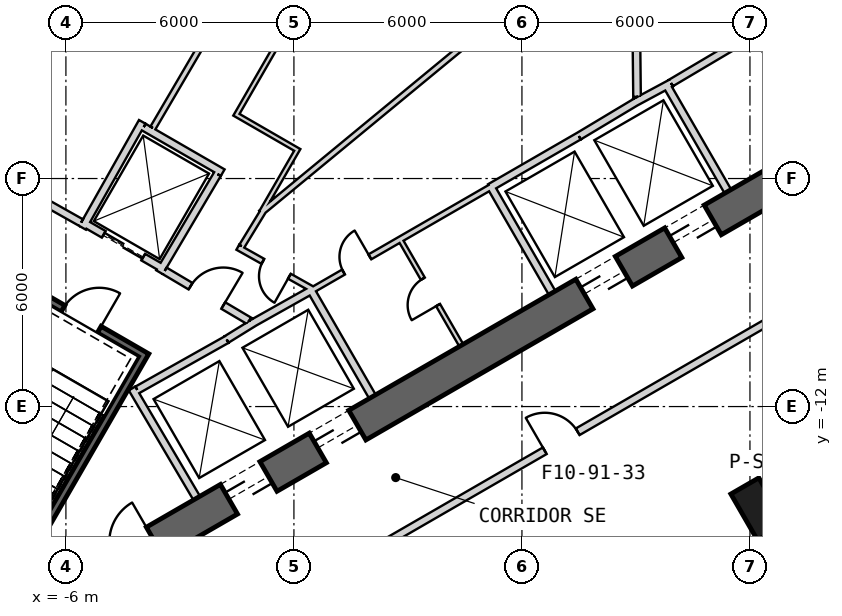
"""IFC4 building model, lengths in metres.
Left out: names, types, materials, properties, quantities, classifications, styles, units other than length and angle.
Written with IfcOpenShell. Run it as: python <this file> out.ifc"""

import sys

from ifc_helpers import new_model, si_unit, direction, frame, frame_2d, origin, origin_2d, place, context, subcontext, project, spatial, rectangle, extrude, element, fill, save


model = new_model("IFC4")
c1 = context("Model", 3, precision=1e-05, world=origin(), true_north=direction((0.0, 1.0)))
c2 = subcontext(c1, "Body", "Model", "MODEL_VIEW")
j1 = project(units=[si_unit("LENGTHUNIT", "METRE"), si_unit("PLANEANGLEUNIT", "RADIAN")], contexts=[c1])
p1 = place(None, origin())
s1 = spatial("IfcSite", under=j1, at=p1, CompositionType="ELEMENT")
p2 = place(p1, origin())
s2 = spatial("IfcBuilding", under=s1, at=p2, CompositionType="ELEMENT")
p3 = place(p2, frame((0.0, 0.0, 398.3)))
s3 = spatial("IfcBuildingStorey", under=s2, at=p3, CompositionType="ELEMENT", Elevation=398.3)
p4 = place(p3, frame((12.216, -14.695, -0.3), z_axis=(0.0, 0.0, 1.0), x_axis=(0.5, -0.866025403784, 0.0)))
e1 = element("IfcColumn", 1, at=p4, inside=s3, PredefinedType="COLUMN", context=c2, shape_type="SweptSolid", body=[
    extrude(rectangle(XDim=1.4, YDim=0.85, at=origin_2d()), origin(), (0.0, 0.0, 1.0), 6.8),
])
p5 = place(p3, frame((-7.825, -17.97, 0.0), z_axis=(0.0, 0.0, 1.0), x_axis=(0.866028369851, 0.499994862586, 0.0)))
e2 = element("IfcWall", 2, at=p5, inside=s3, PredefinedType="SHEAR", context=c2, shape_type="SweptSolid", body=[
    extrude(rectangle(XDim=31.523, YDim=0.9, at=frame_2d((15.762, 0.0))), origin(), (0.0, 0.0, 1.0), 6.5),
])
p6 = place(p5, frame((7.062, 0.0, 0.0)))
e3 = element("IfcOpeningElement", 3, at=p6, cuts=e2, PredefinedType="OPENING", context=c2, shape_type="SweptSolid", body=[
    extrude(rectangle(XDim=1.2, YDim=2.4, at=frame_2d((0.6, 1.2))), frame((0.0, 0.46, 0.0), z_axis=(0.0, -1.0, 0.0), x_axis=(1.0, 0.0, 0.0)), (0.0, 0.0, 1.0), 0.92),
])
p7 = place(p5, frame((9.762, 0.0, 0.0)))
e4 = element("IfcOpeningElement", 4, at=p7, cuts=e2, PredefinedType="OPENING", context=c2, shape_type="SweptSolid", body=[
    extrude(rectangle(XDim=1.2, YDim=2.4, at=frame_2d((0.6, 1.2))), frame((0.0, 0.46, 0.0), z_axis=(0.0, -1.0, 0.0), x_axis=(1.0, 0.0, 0.0)), (0.0, 0.0, 1.0), 0.92),
])
p8 = place(p5, frame((17.862, 0.0, 0.0)))
e5 = element("IfcOpeningElement", 5, at=p8, cuts=e2, PredefinedType="OPENING", context=c2, shape_type="SweptSolid", body=[
    extrude(rectangle(XDim=1.2, YDim=2.4, at=frame_2d((0.6, 1.2))), frame((0.0, 0.46, 0.0), z_axis=(0.0, -1.0, 0.0), x_axis=(1.0, 0.0, 0.0)), (0.0, 0.0, 1.0), 0.92),
])
p9 = place(p5, frame((20.562, 0.0, 0.0)))
e6 = element("IfcOpeningElement", 6, at=p9, cuts=e2, PredefinedType="OPENING", context=c2, shape_type="SweptSolid", body=[
    extrude(rectangle(XDim=1.2, YDim=2.4, at=frame_2d((0.6, 1.2))), frame((0.0, 0.46, 0.0), z_axis=(0.0, -1.0, 0.0), x_axis=(1.0, 0.0, 0.0)), (0.0, 0.0, 1.0), 0.92),
])
p10 = place(p5, frame((26.712, 0.0, 0.0)))
e7 = element("IfcOpeningElement", 7, at=p10, cuts=e2, PredefinedType="OPENING", context=c2, shape_type="SweptSolid", body=[
    extrude(rectangle(XDim=1.2, YDim=2.4, at=frame_2d((0.6, 1.2))), frame((0.0, 0.46, 0.0), z_axis=(0.0, -1.0, 0.0), x_axis=(1.0, 0.0, 0.0)), (0.0, 0.0, 1.0), 0.92),
])
p11 = place(p5, frame((3.612, 0.0, 0.0)))
e8 = element("IfcOpeningElement", 8, at=p11, cuts=e2, PredefinedType="OPENING", context=c2, shape_type="SweptSolid", body=[
    extrude(rectangle(XDim=1.2, YDim=2.4, at=frame_2d((0.6, 1.2))), frame((0.0, 0.46, 0.0), z_axis=(0.0, -1.0, 0.0), x_axis=(1.0, 0.0, 0.0)), (0.0, 0.0, 1.0), 0.92),
])
p12 = place(p3, frame((-2.558, -14.409, 0.0), z_axis=(0.0, 0.0, 1.0), x_axis=(-0.507997497166, 0.861358544901, 0.0)))
e9 = element("IfcWall", 9, at=p12, inside=s3, PredefinedType="PLUMBINGWALL", context=c2, shape_type="SweptSolid", body=[
    extrude(rectangle(XDim=3.35, YDim=0.2, at=frame_2d((1.675, 0.0))), origin(), (0.0, 0.0, 1.0), 6.2),
])
p13 = place(p3, frame((-1.769, -10.237, 0.0), z_axis=(0.0, 0.0, 1.0), x_axis=(-0.871534483978, -0.490334215854, 0.0)))
e10 = element("IfcWall", 10, at=p13, inside=s3, PredefinedType="PLUMBINGWALL", context=c2, shape_type="SweptSolid", body=[
    extrude(rectangle(XDim=2.7, YDim=0.2, at=frame_2d((1.35, 0.0))), origin(), (0.0, 0.0, 1.0), 6.2),
])
p14 = place(p3, frame((0.442, -8.925, 0.0), z_axis=(0.0, 0.0, 1.0), x_axis=(0.499984717929, -0.866034226713, 0.0)))
e11 = element("IfcWall", 11, at=p14, inside=s3, PredefinedType="PLUMBINGWALL", context=c2, shape_type="SweptSolid", body=[
    extrude(rectangle(XDim=3.25, YDim=0.2, at=frame_2d((1.625, 0.0))), origin(), (0.0, 0.0, 1.0), 6.2),
])
p15 = place(p3, frame((-1.024, -9.771, 0.0), z_axis=(0.0, 0.0, 1.0), x_axis=(-0.850348075135, -0.526220629693, 0.0)))
e12 = element("IfcWall", 12, at=p15, inside=s3, PredefinedType="PLUMBINGWALL", context=c2, shape_type="SweptSolid", body=[
    extrude(rectangle(XDim=0.878, YDim=0.2, at=frame_2d((0.439, 0.0))), origin(), (0.0, 0.0, 1.0), 6.2),
])
p16 = place(p3, frame((-1.13, -9.832, 0.0), z_axis=(0.0, 0.0, 1.0), x_axis=(0.871988740738, 0.489525929882, 0.0)))
e13 = element("IfcWall", 13, at=p16, inside=s3, PredefinedType="PLUMBINGWALL", context=c2, shape_type="SweptSolid", body=[
    extrude(rectangle(XDim=1.845, YDim=0.2, at=frame_2d((0.922, 0.0))), origin(), (0.0, 0.0, 1.0), 6.2),
])
p17 = place(p3, frame((6.795, -9.01, 0.0), z_axis=(0.0, 0.0, 1.0), x_axis=(-0.499984717929, 0.866034226713, 0.0)))
e14 = element("IfcWall", 14, at=p17, inside=s3, PredefinedType="PLUMBINGWALL", context=c2, shape_type="SweptSolid", body=[
    extrude(rectangle(XDim=3.25, YDim=0.2, at=frame_2d((1.625, 0.0))), origin(), (0.0, 0.0, 1.0), 6.2),
])
p18 = place(p3, frame((5.159, -6.236, 0.0), z_axis=(0.0, 0.0, 1.0), x_axis=(0.866036505625, 0.499980770555, 0.0)))
e15 = element("IfcWall", 15, at=p18, inside=s3, PredefinedType="PLUMBINGWALL", context=c2, shape_type="SweptSolid", body=[
    extrude(rectangle(XDim=2.7, YDim=0.2, at=frame_2d((1.35, 0.0))), origin(), (0.0, 0.0, 1.0), 6.2),
])
p19 = place(p3, frame((9.795, -3.525, 0.0), z_axis=(0.0, 0.0, 1.0), x_axis=(0.499984717929, -0.866034226713, 0.0)))
e16 = element("IfcWall", 16, at=p19, inside=s3, PredefinedType="PLUMBINGWALL", context=c2, shape_type="SweptSolid", body=[
    extrude(rectangle(XDim=3.25, YDim=0.2, at=frame_2d((1.625, 0.0))), origin(), (0.0, 0.0, 1.0), 6.2),
])
p20 = place(p3, frame((8.974, -3.999, 0.0), z_axis=(0.0, 0.0, 1.0), x_axis=(0.880907015104, 0.473289373154, 0.0)))
e17 = element("IfcWall", 17, at=p20, inside=s3, PredefinedType="PLUMBINGWALL", context=c2, shape_type="SweptSolid", body=[
    extrude(rectangle(XDim=1.078, YDim=0.2, at=frame_2d((0.539, 0.0))), origin(), (0.0, 0.0, 1.0), 6.2),
])
p21 = place(p3, frame((7.497, -4.886, 0.0), z_axis=(0.0, 0.0, 1.0), x_axis=(0.857516281273, 0.51445682749, 0.0)))
e18 = element("IfcWall", 18, at=p21, inside=s3, PredefinedType="PLUMBINGWALL", context=c2, shape_type="SweptSolid", body=[
    extrude(rectangle(XDim=1.845, YDim=0.2, at=frame_2d((0.922, 0.0))), origin(), (0.0, 0.0, 1.0), 6.2),
])
p22 = place(p3, frame((-3.905, -10.563, -0.3), z_axis=(0.0, 0.0, 1.0), x_axis=(-0.500012932018, -0.866017937352, 0.0)))
e19 = element("IfcWall", 19, at=p22, inside=s3, PredefinedType="SHEAR", context=c2, shape_type="SweptSolid", body=[
    extrude(rectangle(XDim=8.1, YDim=0.2, at=frame_2d((4.05, 0.0))), origin(), (0.0, 0.0, 1.0), 6.5),
])
p23 = place(p3, frame((-4.041, -10.599, -0.3), z_axis=(0.0, 0.0, 1.0), x_axis=(-0.866047807691, 0.499961193289, 0.0)))
e20 = element("IfcWall", 20, at=p23, inside=s3, PredefinedType="SHEAR", context=c2, shape_type="SweptSolid", body=[
    extrude(rectangle(XDim=3.6, YDim=0.2, at=frame_2d((1.8, 0.0))), origin(), (0.0, 0.0, 1.0), 6.5),
])
p24 = place(p23, frame((1.25, 0.0, 0.3)))
e21 = element("IfcOpeningElement", 21, at=p24, cuts=e20, PredefinedType="OPENING", context=c2, shape_type="SweptSolid", body=[
    extrude(rectangle(XDim=1.1, YDim=2.1, at=frame_2d((0.55, 1.05))), frame((0.0, 0.11, 0.0), z_axis=(0.0, -1.0, 0.0), x_axis=(1.0, 0.0, 0.0)), (0.0, 0.0, 1.0), 0.22),
])
p25 = place(p3, frame((-3.446, -8.368, 0.0), z_axis=(0.0, 0.0, 1.0), x_axis=(-0.866024647952, 0.500001309137, 0.0)))
e22 = element("IfcWall", 22, at=p25, inside=s3, PredefinedType="PLUMBINGWALL", context=c2, shape_type="SweptSolid", body=[
    extrude(rectangle(XDim=2.4, YDim=0.2, at=frame_2d((1.2, 0.0))), origin(), (0.0, 0.0, 1.0), 6.2),
])
p26 = place(p25, frame((0.6, 0.0, 0.0)))
e23 = element("IfcOpeningElement", 23, at=p26, cuts=e22, PredefinedType="OPENING", context=c2, shape_type="SweptSolid", body=[
    extrude(rectangle(XDim=1.2, YDim=2.4, at=frame_2d((0.6, 1.2))), frame((0.0, 0.11, 0.0), z_axis=(0.0, -1.0, 0.0), x_axis=(1.0, 0.0, 0.0)), (0.0, 0.0, 1.0), 0.22),
])
p27 = place(p3, frame((-5.562, -7.296, 0.0), z_axis=(0.0, 0.0, 1.0), x_axis=(0.491358283181, 0.870957540612, 0.0)))
e24 = element("IfcWall", 24, at=p27, inside=s3, PredefinedType="PLUMBINGWALL", context=c2, shape_type="SweptSolid", body=[
    extrude(rectangle(XDim=3.2, YDim=0.2, at=frame_2d((1.6, 0.0))), origin(), (0.0, 0.0, 1.0), 6.2),
])
p28 = place(p3, frame((-3.953, -4.646, 0.0), z_axis=(0.0, 0.0, 1.0), x_axis=(0.866024647952, -0.500001309137, 0.0)))
e25 = element("IfcWall", 25, at=p28, inside=s3, PredefinedType="PLUMBINGWALL", context=c2, shape_type="SweptSolid", body=[
    extrude(rectangle(XDim=2.4, YDim=0.2, at=frame_2d((1.2, 0.0))), origin(), (0.0, 0.0, 1.0), 6.2),
])
p29 = place(p3, frame((-2.012, -5.882, 0.0), z_axis=(0.0, 0.0, 1.0), x_axis=(-0.508619639323, -0.860991325447, 0.0)))
e26 = element("IfcWall", 26, at=p29, inside=s3, PredefinedType="PLUMBINGWALL", context=c2, shape_type="SweptSolid", body=[
    extrude(rectangle(XDim=3.0, YDim=0.2, at=frame_2d((1.5, 0.0))), origin(), (0.0, 0.0, 1.0), 6.2),
])
p30 = place(p3, frame((4.405, -10.389, 0.0), z_axis=(0.0, 0.0, 1.0), x_axis=(-0.500017246033, 0.866015446554, 0.0)))
e27 = element("IfcWall", 27, at=p30, inside=s3, PredefinedType="PARTITIONING", context=c2, shape_type="SweptSolid", body=[
    extrude(rectangle(XDim=3.25, YDim=0.12, at=frame_2d((1.625, 0.0))), origin(), (0.0, 0.0, 1.0), 6.2),
])
p31 = place(p30, frame((1.225, 0.0, 0.0)))
e28 = element("IfcOpeningElement", 28, at=p31, cuts=e27, PredefinedType="OPENING", context=c2, shape_type="SweptSolid", body=[
    extrude(rectangle(XDim=0.8, YDim=2.1, at=frame_2d((0.4, 1.05))), frame((0.0, 0.07, 0.0), z_axis=(0.0, -1.0, 0.0), x_axis=(1.0, 0.0, 0.0)), (0.0, 0.0, 1.0), 0.14),
])
p32 = place(p3, frame((0.483, -8.936, 0.0), z_axis=(0.0, 0.0, 1.0), x_axis=(0.866028230842, 0.499995103361, 0.0)))
e29 = element("IfcWall", 29, at=p32, inside=s3, PredefinedType="PLUMBINGWALL", context=c2, shape_type="SweptSolid", body=[
    extrude(rectangle(XDim=5.4, YDim=0.15, at=frame_2d((2.7, 0.0))), origin(), (0.0, 0.0, 1.0), 6.2),
])
p33 = place(p32, frame((0.95, 0.0, 0.0)))
e30 = element("IfcOpeningElement", 30, at=p33, cuts=e29, PredefinedType="OPENING", context=c2, shape_type="SweptSolid", body=[
    extrude(rectangle(XDim=0.8, YDim=2.1, at=frame_2d((0.4, 1.05))), frame((0.0, 0.085, 0.0), z_axis=(0.0, -1.0, 0.0), x_axis=(1.0, 0.0, 0.0)), (0.0, 0.0, 1.0), 0.17),
])
p34 = place(p3, frame((12.245, -2.109, 0.0), z_axis=(0.0, 0.0, 1.0), x_axis=(-0.860414880418, -0.509594185166, 0.0)))
e31 = element("IfcWall", 31, at=p34, inside=s3, PredefinedType="PARTITIONING", context=c2, shape_type="SweptSolid", body=[
    extrude(rectangle(XDim=2.7, YDim=0.2, at=frame_2d((1.35, 0.0))), origin(), (0.0, 0.0, 1.0), 6.2),
])
p35 = place(p3, frame((13.758, -4.99, 0.0), z_axis=(0.0, 0.0, 1.0), x_axis=(-0.491993409184, 0.87059892334, 0.0)))
e32 = element("IfcWall", 32, at=p35, inside=s3, PredefinedType="PARTITIONING", context=c2, shape_type="SweptSolid", body=[
    extrude(rectangle(XDim=3.15, YDim=0.2, at=frame_2d((1.575, 0.0))), origin(), (0.0, 0.0, 1.0), 6.2),
])
p36 = place(p35, frame((1.175, 0.0, 0.0)))
e33 = element("IfcOpeningElement", 33, at=p36, cuts=e32, PredefinedType="OPENING", context=c2, shape_type="SweptSolid", body=[
    extrude(rectangle(XDim=0.8, YDim=2.1, at=frame_2d((0.4, 1.05))), frame((0.0, 0.11, 0.0), z_axis=(0.0, -1.0, 0.0), x_axis=(1.0, 0.0, 0.0)), (0.0, 0.0, 1.0), 0.22),
])
p37 = place(p3, frame((9.029, -3.851, 0.0), z_axis=(0.0, 0.0, 1.0), x_axis=(-0.010784614026, 0.999941844359, 0.0)))
e34 = element("IfcWall", 34, at=p37, inside=s3, PredefinedType="PARTITIONING", context=c2, shape_type="SweptSolid", body=[
    extrude(rectangle(XDim=2.581, YDim=0.2, at=frame_2d((1.291, 0.0))), origin(), (0.0, 0.0, 1.0), 6.2),
])
p38 = place(p3, frame((-7.976, -5.823, 0.0), z_axis=(0.0, 0.0, 1.0), x_axis=(0.871329070694, -0.490699144653, 0.0)))
e35 = element("IfcWall", 35, at=p38, inside=s3, PredefinedType="PARTITIONING", context=c2, shape_type="SweptSolid", body=[
    extrude(rectangle(XDim=2.726, YDim=0.2, at=frame_2d((1.363, 0.0))), origin(), (0.0, 0.0, 1.0), 6.2),
])
p39 = place(p3, frame((-3.401, -8.43, 0.0), z_axis=(0.0, 0.0, 1.0), x_axis=(0.860598681535, -0.509283721849, 0.0)))
e36 = element("IfcWall", 36, at=p39, inside=s3, PredefinedType="PARTITIONING", context=c2, shape_type="SweptSolid", body=[
    extrude(rectangle(XDim=2.581, YDim=0.2, at=frame_2d((1.291, 0.0))), origin(), (0.0, 0.0, 1.0), 6.2),
])
p40 = place(p39, frame((0.791, 0.0, 0.0)))
e37 = element("IfcOpeningElement", 37, at=p40, cuts=e36, PredefinedType="OPENING", context=c2, shape_type="SweptSolid", body=[
    extrude(rectangle(XDim=1.0, YDim=2.1, at=frame_2d((0.5, 1.05))), frame((0.0, 0.11, 0.0), z_axis=(0.0, -1.0, 0.0), x_axis=(1.0, 0.0, 0.0)), (0.0, 0.0, 1.0), 0.22),
])
p41 = place(p3, frame((-3.711, -4.67, 0.0), z_axis=(0.0, 0.0, 1.0), x_axis=(0.505648368764, 0.86273966361, 0.0)))
e38 = element("IfcWall", 38, at=p41, inside=s3, PredefinedType="PLUMBINGWALL", context=c2, shape_type="SweptSolid", body=[
    extrude(rectangle(XDim=4.404, YDim=0.15, at=frame_2d((2.202, 0.0))), origin(), (0.0, 0.0, 1.0), 6.2),
])
p42 = place(p3, frame((6.046, -1.2, 0.0), z_axis=(0.0, 0.0, 1.0), x_axis=(-0.771489624803, -0.636241902755, 0.0)))
e39 = element("IfcWall", 39, at=p42, inside=s3, PredefinedType="PLUMBINGWALL", context=c2, shape_type="SweptSolid", body=[
    extrude(rectangle(XDim=8.961, YDim=0.15, at=frame_2d((4.48, 0.0))), origin(), (0.0, 0.0, 1.0), 6.2),
])
p43 = place(p3, frame((-1.477, -7.808, 0.0), z_axis=(0.0, 0.0, 1.0), x_axis=(0.871822901869, -0.48982122022, 0.0)))
e40 = element("IfcWall", 40, at=p43, inside=s3, PredefinedType="PLUMBINGWALL", context=c2, shape_type="SweptSolid", body=[
    extrude(rectangle(XDim=2.24, YDim=0.15, at=frame_2d((1.12, 0.0))), origin(), (0.0, 0.0, 1.0), 6.2),
])
p44 = place(p43, frame((0.757, 0.0, 0.0)))
e41 = element("IfcOpeningElement", 41, at=p44, cuts=e40, PredefinedType="OPENING", context=c2, shape_type="SweptSolid", body=[
    extrude(rectangle(XDim=0.8, YDim=2.1, at=frame_2d((0.4, 1.05))), frame((0.0, 0.085, 0.0), z_axis=(0.0, -1.0, 0.0), x_axis=(1.0, 0.0, 0.0)), (0.0, 0.0, 1.0), 0.17),
])
p45 = place(p3, frame((-0.787, -6.821, 0.0), z_axis=(0.0, 0.0, 1.0), x_axis=(-0.520993333897, -0.853560745369, 0.0)))
e42 = element("IfcWall", 42, at=p45, inside=s3, PredefinedType="PLUMBINGWALL", context=c2, shape_type="SweptSolid", body=[
    extrude(rectangle(XDim=1.125, YDim=0.15, at=frame_2d((0.562, 0.0))), origin(), (0.0, 0.0, 1.0), 6.2),
])
p46 = place(p3, frame((0.118, -5.195, 0.0), z_axis=(0.0, 0.0, 1.0), x_axis=(-0.499969367985, -0.866043088465, 0.0)))
e43 = element("IfcWall", 43, at=p46, inside=s3, PredefinedType="PARTITIONING", context=c2, shape_type="SweptSolid", body=[
    extrude(rectangle(XDim=1.94, YDim=0.12, at=frame_2d((0.97, 0.0))), origin(), (0.0, 0.0, 1.0), 6.2),
])
p47 = place(p3, frame((-1.566, -4.292, 0.0), z_axis=(0.0, 0.0, 1.0), x_axis=(0.866091100096, -0.499886193382, 0.0)))
e44 = element("IfcWall", 44, at=p47, inside=s3, PredefinedType="PARTITIONING", context=c2, shape_type="SweptSolid", body=[
    extrude(rectangle(XDim=1.85, YDim=0.12, at=frame_2d((0.925, 0.0))), origin(), (0.0, 0.0, 1.0), 6.2),
])
p48 = place(p3, frame((0.052, -1.61, 0.0), z_axis=(0.0, 0.0, 1.0), x_axis=(-0.500011413361, -0.866018814177, 0.0)))
e45 = element("IfcWall", 45, at=p48, inside=s3, PredefinedType="PARTITIONING", context=c2, shape_type="SweptSolid", body=[
    extrude(rectangle(XDim=3.072, YDim=0.12, at=frame_2d((1.536, 0.0))), origin(), (0.0, 0.0, 1.0), 6.2),
])
p49 = place(p3, frame((1.009, -16.391, 0.0), z_axis=(0.0, 0.0, 1.0), x_axis=(0.866026744585, 0.499997677658, 0.0)))
e46 = element("IfcWall", 46, at=p49, inside=s3, PredefinedType="PARTITIONING", context=c2, shape_type="SweptSolid", body=[
    extrude(rectangle(XDim=13.617, YDim=0.2, at=frame_2d((6.808, 0.0))), origin(), (0.0, 0.0, 1.0), 5.67),
])
p50 = place(p49, frame((6.456, 0.0, 0.0)))
e47 = element("IfcOpeningElement", 47, at=p50, cuts=e46, PredefinedType="OPENING", context=c2, shape_type="SweptSolid", body=[
    extrude(rectangle(XDim=1.0, YDim=2.1, at=frame_2d((0.5, 1.05))), frame((0.0, 0.11, 0.0), z_axis=(0.0, -1.0, 0.0), x_axis=(1.0, 0.0, 0.0)), (0.0, 0.0, 1.0), 0.22),
])
p51 = place(p24, origin())
e48 = element("IfcDoor", 48, at=p51, inside=s3, OperationType="SINGLE_SWING_LEFT", PredefinedType="USERDEFINED", context=c2, shape_type="SweptSolid", body=[
    extrude(rectangle(XDim=1.1, YDim=2.1, at=frame_2d((0.55, 1.05))), frame((0.0, 0.025, 0.0), z_axis=(0.0, -1.0, 0.0), x_axis=(1.0, 0.0, 0.0)), (0.0, 0.0, 1.0), 0.05),
])
fill(e21, e48)
p52 = place(p40, origin())
e49 = element("IfcDoor", 49, at=p52, inside=s3, OperationType="SINGLE_SWING_RIGHT", PredefinedType="USERDEFINED", context=c2, shape_type="SweptSolid", body=[
    extrude(rectangle(XDim=1.0, YDim=2.1, at=frame_2d((0.5, 1.05))), frame((0.0, 0.025, 0.0), z_axis=(0.0, -1.0, 0.0), x_axis=(1.0, 0.0, 0.0)), (0.0, 0.0, 1.0), 0.05),
])
fill(e37, e49)
p53 = place(p26, origin())
e50 = element("IfcDoor", 50, at=p53, inside=s3, OperationType="SLIDING_TO_LEFT", PredefinedType="USERDEFINED", context=c2, shape_type="SweptSolid", body=[
    extrude(rectangle(XDim=1.2, YDim=2.4, at=frame_2d((0.6, 1.2))), frame((0.0, 0.025, 0.0), z_axis=(0.0, -1.0, 0.0), x_axis=(1.0, 0.0, 0.0)), (0.0, 0.0, 1.0), 0.05),
])
fill(e23, e50)
p54 = place(p44, origin())
e51 = element("IfcDoor", 51, at=p54, inside=s3, OperationType="SINGLE_SWING_RIGHT", PredefinedType="USERDEFINED", context=c2, shape_type="SweptSolid", body=[
    extrude(rectangle(XDim=0.8, YDim=2.1, at=frame_2d((0.4, 1.05))), frame((0.0, 0.025, 0.0), z_axis=(0.0, -1.0, 0.0), x_axis=(1.0, 0.0, 0.0)), (0.0, 0.0, 1.0), 0.05),
])
fill(e41, e51)
p55 = place(p31, origin())
e52 = element("IfcDoor", 52, at=p55, inside=s3, OperationType="SINGLE_SWING_LEFT", PredefinedType="USERDEFINED", context=c2, shape_type="SweptSolid", body=[
    extrude(rectangle(XDim=0.8, YDim=2.1, at=frame_2d((0.4, 1.05))), frame((0.0, 0.025, 0.0), z_axis=(0.0, -1.0, 0.0), x_axis=(1.0, 0.0, 0.0)), (0.0, 0.0, 1.0), 0.05),
])
fill(e28, e52)
p56 = place(p33, origin())
e53 = element("IfcDoor", 53, at=p56, inside=s3, OperationType="SINGLE_SWING_RIGHT", PredefinedType="USERDEFINED", context=c2, shape_type="SweptSolid", body=[
    extrude(rectangle(XDim=0.8, YDim=2.1, at=frame_2d((0.4, 1.05))), frame((0.0, 0.025, 0.0), z_axis=(0.0, -1.0, 0.0), x_axis=(1.0, 0.0, 0.0)), (0.0, 0.0, 1.0), 0.05),
])
fill(e30, e53)
p57 = place(p50, origin())
e54 = element("IfcDoor", 54, at=p57, inside=s3, OperationType="SINGLE_SWING_LEFT", PredefinedType="USERDEFINED", context=c2, shape_type="SweptSolid", body=[
    extrude(rectangle(XDim=1.0, YDim=2.1, at=frame_2d((0.5, 1.05))), frame((0.0, 0.025, 0.0), z_axis=(0.0, -1.0, 0.0), x_axis=(1.0, 0.0, 0.0)), (0.0, 0.0, 1.0), 0.05),
])
fill(e47, e54)
p58 = place(p6, origin())
e55 = element("IfcDoor", 55, at=p58, inside=s3, OperationType="SLIDING_TO_LEFT", PredefinedType="USERDEFINED", context=c2, shape_type="SweptSolid", body=[
    extrude(rectangle(XDim=1.2, YDim=2.4, at=frame_2d((0.6, 1.2))), frame((0.0, 0.025, 0.0), z_axis=(0.0, -1.0, 0.0), x_axis=(1.0, 0.0, 0.0)), (0.0, 0.0, 1.0), 0.05),
])
fill(e3, e55)
p59 = place(p7, origin())
e56 = element("IfcDoor", 56, at=p59, inside=s3, OperationType="SLIDING_TO_LEFT", PredefinedType="USERDEFINED", context=c2, shape_type="SweptSolid", body=[
    extrude(rectangle(XDim=1.2, YDim=2.4, at=frame_2d((0.6, 1.2))), frame((0.0, 0.025, 0.0), z_axis=(0.0, -1.0, 0.0), x_axis=(1.0, 0.0, 0.0)), (0.0, 0.0, 1.0), 0.05),
])
fill(e4, e56)
p60 = place(p8, origin())
e57 = element("IfcDoor", 57, at=p60, inside=s3, OperationType="SLIDING_TO_LEFT", PredefinedType="USERDEFINED", context=c2, shape_type="SweptSolid", body=[
    extrude(rectangle(XDim=1.2, YDim=2.4, at=frame_2d((0.6, 1.2))), frame((0.0, 0.025, 0.0), z_axis=(0.0, -1.0, 0.0), x_axis=(1.0, 0.0, 0.0)), (0.0, 0.0, 1.0), 0.05),
])
fill(e5, e57)
p61 = place(p9, origin())
e58 = element("IfcDoor", 58, at=p61, inside=s3, OperationType="SLIDING_TO_LEFT", PredefinedType="USERDEFINED", context=c2, shape_type="SweptSolid", body=[
    extrude(rectangle(XDim=1.2, YDim=2.4, at=frame_2d((0.6, 1.2))), frame((0.0, 0.025, 0.0), z_axis=(0.0, -1.0, 0.0), x_axis=(1.0, 0.0, 0.0)), (0.0, 0.0, 1.0), 0.05),
])
fill(e6, e58)
save(model, sys.argv[1])
